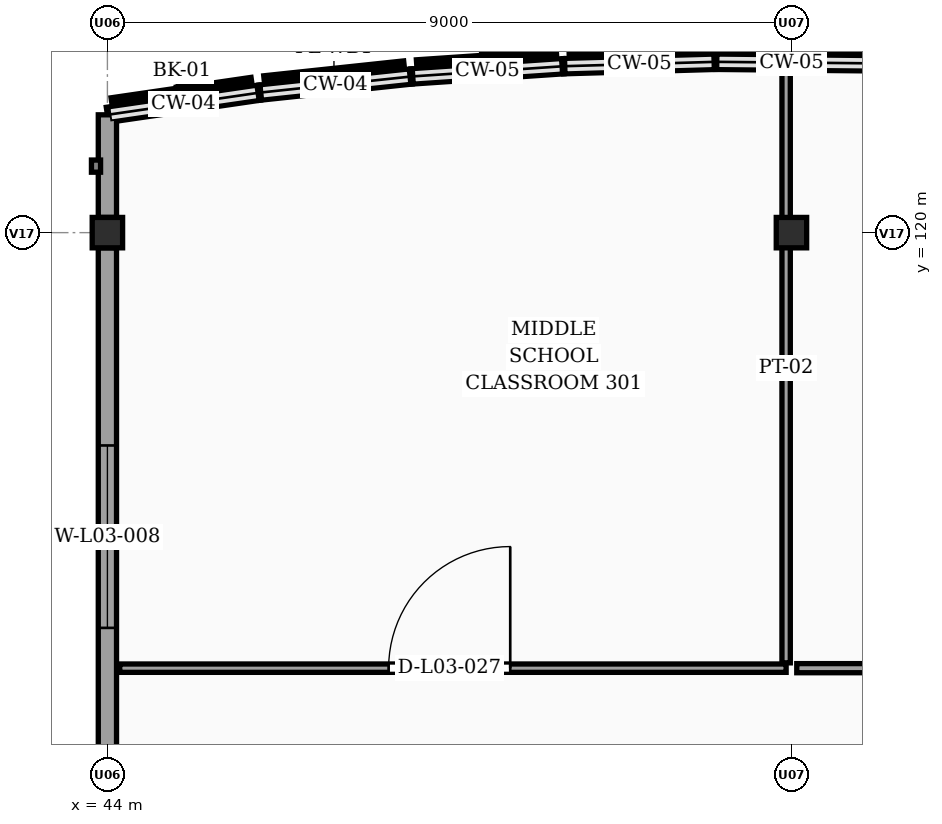
"""IFC4 building model, lengths in metres.
Left out: names, types, materials, properties, quantities, classifications, styles, units other than length and angle.
Written with IfcOpenShell. Run it as: python <this file> out.ifc"""

import sys

from ifc_helpers import new_model, si_unit, direction, frame, frame_2d, origin, origin_2d, place, context, subcontext, project, spatial, rectangle, extrude, element, fill, save


model = new_model("IFC4")
c1 = context("Model", 3, precision=1e-05, world=origin(), true_north=direction((0.0, 1.0)))
c2 = subcontext(c1, "Body", "Model", "MODEL_VIEW")
j1 = project(units=[si_unit("LENGTHUNIT", "METRE"), si_unit("PLANEANGLEUNIT", "RADIAN")], contexts=[c1])
p1 = place(None, origin())
s1 = spatial("IfcSite", under=j1, at=p1, CompositionType="ELEMENT")
p2 = place(p1, origin())
s2 = spatial("IfcBuilding", under=s1, at=p2, CompositionType="ELEMENT")
p3 = place(p2, frame((0.0, 0.0, 12.3)))
s3 = spatial("IfcBuildingStorey", under=s2, at=p3, CompositionType="ELEMENT", Elevation=12.3)
for number, where, z_axis, x_axis in (
    (1, (44.0, 120.0, 0.0), (0.0, 0.0, 1.0), (1.0, 0.0, 0.0)),
    (2, (53.0, 120.0, 0.0), (0.0, 0.0, 1.0), (1.0, 0.0, 0.0)),
):
    element("IfcColumn", number, at=place(p3, frame(where, z_axis=z_axis, x_axis=x_axis)), inside=s3, PredefinedType="COLUMN", context=c2, shape_type="SweptSolid", body=[
        extrude(rectangle(XDim=0.4, YDim=0.4, at=origin_2d()), origin(), (0.0, 0.0, 1.0), 3.9),
    ])
p4 = place(p3, frame((44.0, 121.55, 0.0), z_axis=(0.0, 0.0, 1.0), x_axis=(0.989544477223, 0.144228040259, 0.0)))
e3 = element("IfcWall", 3, at=p4, inside=s3, PredefinedType="SOLIDWALL", context=c2, shape_type="SweptSolid", body=[
    extrude(rectangle(XDim=2.021, YDim=0.2, at=frame_2d((1.011, 0.0))), origin(), (0.0, 0.0, 1.0), 0.95),
])
p5 = place(p3, frame((46.0, 121.842, 0.0), z_axis=(0.0, 0.0, 1.0), x_axis=(0.994395160059, 0.105727317433, 0.0)))
e4 = element("IfcWall", 4, at=p5, inside=s3, PredefinedType="SOLIDWALL", context=c2, shape_type="SweptSolid", body=[
    extrude(rectangle(XDim=2.011, YDim=0.2, at=frame_2d((1.006, 0.0))), origin(), (0.0, 0.0, 1.0), 0.95),
])
p6 = place(p3, frame((48.0, 122.054, 0.0), z_axis=(0.0, 0.0, 1.0), x_axis=(0.997729302978, 0.067351599676, 0.0)))
e5 = element("IfcWall", 5, at=p6, inside=s3, PredefinedType="SOLIDWALL", context=c2, shape_type="SweptSolid", body=[
    extrude(rectangle(XDim=2.005, YDim=0.2, at=frame_2d((1.002, 0.0))), origin(), (0.0, 0.0, 1.0), 0.95),
])
p7 = place(p3, frame((50.0, 122.189, 0.0), z_axis=(0.0, 0.0, 1.0), x_axis=(0.999581770858, 0.028918564416, 0.0)))
e6 = element("IfcWall", 6, at=p7, inside=s3, PredefinedType="SOLIDWALL", context=c2, shape_type="SweptSolid", body=[
    extrude(rectangle(XDim=2.001, YDim=0.2, at=frame_2d((1.0, 0.0))), origin(), (0.0, 0.0, 1.0), 0.95),
])
p8 = place(p3, frame((52.0, 122.247, 0.0), z_axis=(0.0, 0.0, 1.0), x_axis=(0.999953504169, -0.009643106302, 0.0)))
e7 = element("IfcWall", 7, at=p8, inside=s3, PredefinedType="SOLIDWALL", context=c2, shape_type="SweptSolid", body=[
    extrude(rectangle(XDim=2.0, YDim=0.2, at=frame_2d((1.0, 0.0))), origin(), (0.0, 0.0, 1.0), 0.95),
])
p9 = place(p3, frame((44.0, 112.2, 0.0), z_axis=(0.0, 0.0, 1.0), x_axis=(0.0, 1.0, 0.0)))
e8 = element("IfcWall", 8, at=p9, inside=s3, PredefinedType="SOLIDWALL", context=c2, shape_type="SweptSolid", body=[
    extrude(rectangle(XDim=7.6, YDim=0.24, at=frame_2d((3.8, 0.0))), origin(), (0.0, 0.0, 1.0), 3.29),
])
p10 = place(p9, frame((2.6, 0.0, 0.95)))
e9 = element("IfcOpeningElement", 9, at=p10, cuts=e8, PredefinedType="OPENING", context=c2, shape_type="SweptSolid", body=[
    extrude(rectangle(XDim=2.4, YDim=1.5, at=frame_2d((1.2, 0.75))), frame((0.0, 0.13, 0.0), z_axis=(0.0, -1.0, 0.0), x_axis=(1.0, 0.0, 0.0)), (0.0, 0.0, 1.0), 0.26),
])
p11 = place(p3, frame((44.0, 120.2, 0.0), z_axis=(0.0, 0.0, 1.0), x_axis=(0.0, 1.0, 0.0)))
e10 = element("IfcWall", 10, at=p11, inside=s3, PredefinedType="SOLIDWALL", context=c2, shape_type="SweptSolid", body=[
    extrude(rectangle(XDim=1.35, YDim=0.24, at=frame_2d((0.675, 0.0))), origin(), (0.0, 0.0, 1.0), 3.29),
])
p12 = place(p3, frame((44.162, 114.27, 0.0), z_axis=(0.0, 0.0, 1.0), x_axis=(1.0, 0.0, 0.0)))
e11 = element("IfcWall", 11, at=p12, inside=s3, PredefinedType="PARTITIONING", context=c2, shape_type="SweptSolid", body=[
    extrude(rectangle(XDim=8.768, YDim=0.11, at=frame_2d((4.384, 0.0))), origin(), (0.0, 0.0, 1.0), 3.65),
])
p13 = place(p12, frame((3.538, 0.0, 0.0)))
e12 = element("IfcOpeningElement", 12, at=p13, cuts=e11, PredefinedType="OPENING", context=c2, shape_type="SweptSolid", body=[
    extrude(rectangle(XDim=1.6, YDim=2.2, at=frame_2d((0.8, 1.1))), frame((0.0, 0.065, 0.0), z_axis=(0.0, -1.0, 0.0), x_axis=(1.0, 0.0, 0.0)), (0.0, 0.0, 1.0), 0.13),
])
p14 = place(p3, frame((52.93, 114.34, 0.0), z_axis=(0.0, 0.0, 1.0), x_axis=(0.0, 1.0, 0.0)))
e13 = element("IfcWall", 13, at=p14, inside=s3, PredefinedType="PARTITIONING", context=c2, shape_type="SweptSolid", body=[
    extrude(rectangle(XDim=7.756, YDim=0.11, at=frame_2d((3.878, 0.0))), origin(), (0.0, 0.0, 1.0), 3.09),
])
p15 = place(p3, frame((53.07, 114.27, 0.0), z_axis=(0.0, 0.0, 1.0), x_axis=(1.0, 0.0, 0.0)))
e14 = element("IfcWall", 14, at=p15, inside=s3, PredefinedType="PARTITIONING", context=c2, shape_type="SweptSolid", body=[
    extrude(rectangle(XDim=11.86, YDim=0.12, at=frame_2d((5.93, 0.0))), origin(), (0.0, 0.0, 1.0), 3.65),
])
p16 = place(p15, frame((4.59, 0.0, 0.0)))
e15 = element("IfcOpeningElement", 15, at=p16, cuts=e14, PredefinedType="OPENING", context=c2, shape_type="SweptSolid", body=[
    extrude(rectangle(XDim=1.68, YDim=2.2, at=frame_2d((0.84, 1.1))), frame((0.0, 0.07, 0.0), z_axis=(0.0, -1.0, 0.0), x_axis=(1.0, 0.0, 0.0)), (0.0, 0.0, 1.0), 0.14),
])
p17 = place(p10, origin())
e16 = element("IfcWindow", 16, at=p17, inside=s3, PartitioningType="DOUBLE_PANEL_VERTICAL", PredefinedType="WINDOW", context=c2, shape_type="SweptSolid", body=[
    extrude(rectangle(XDim=2.4, YDim=1.5, at=frame_2d((1.2, 0.75))), frame((0.0, 0.03, 0.0), z_axis=(0.0, -1.0, 0.0), x_axis=(1.0, 0.0, 0.0)), (0.0, 0.0, 1.0), 0.06),
])
fill(e9, e16)
p18 = place(p13, origin())
e17 = element("IfcDoor", 17, at=p18, inside=s3, OperationType="SINGLE_SWING_RIGHT", PredefinedType="DOOR", context=c2, shape_type="SweptSolid", body=[
    extrude(rectangle(XDim=1.6, YDim=2.2, at=frame_2d((0.8, 1.1))), frame((0.0, 0.025, 0.0), z_axis=(0.0, -1.0, 0.0), x_axis=(1.0, 0.0, 0.0)), (0.0, 0.0, 1.0), 0.05),
])
fill(e12, e17)
save(model, sys.argv[1])
